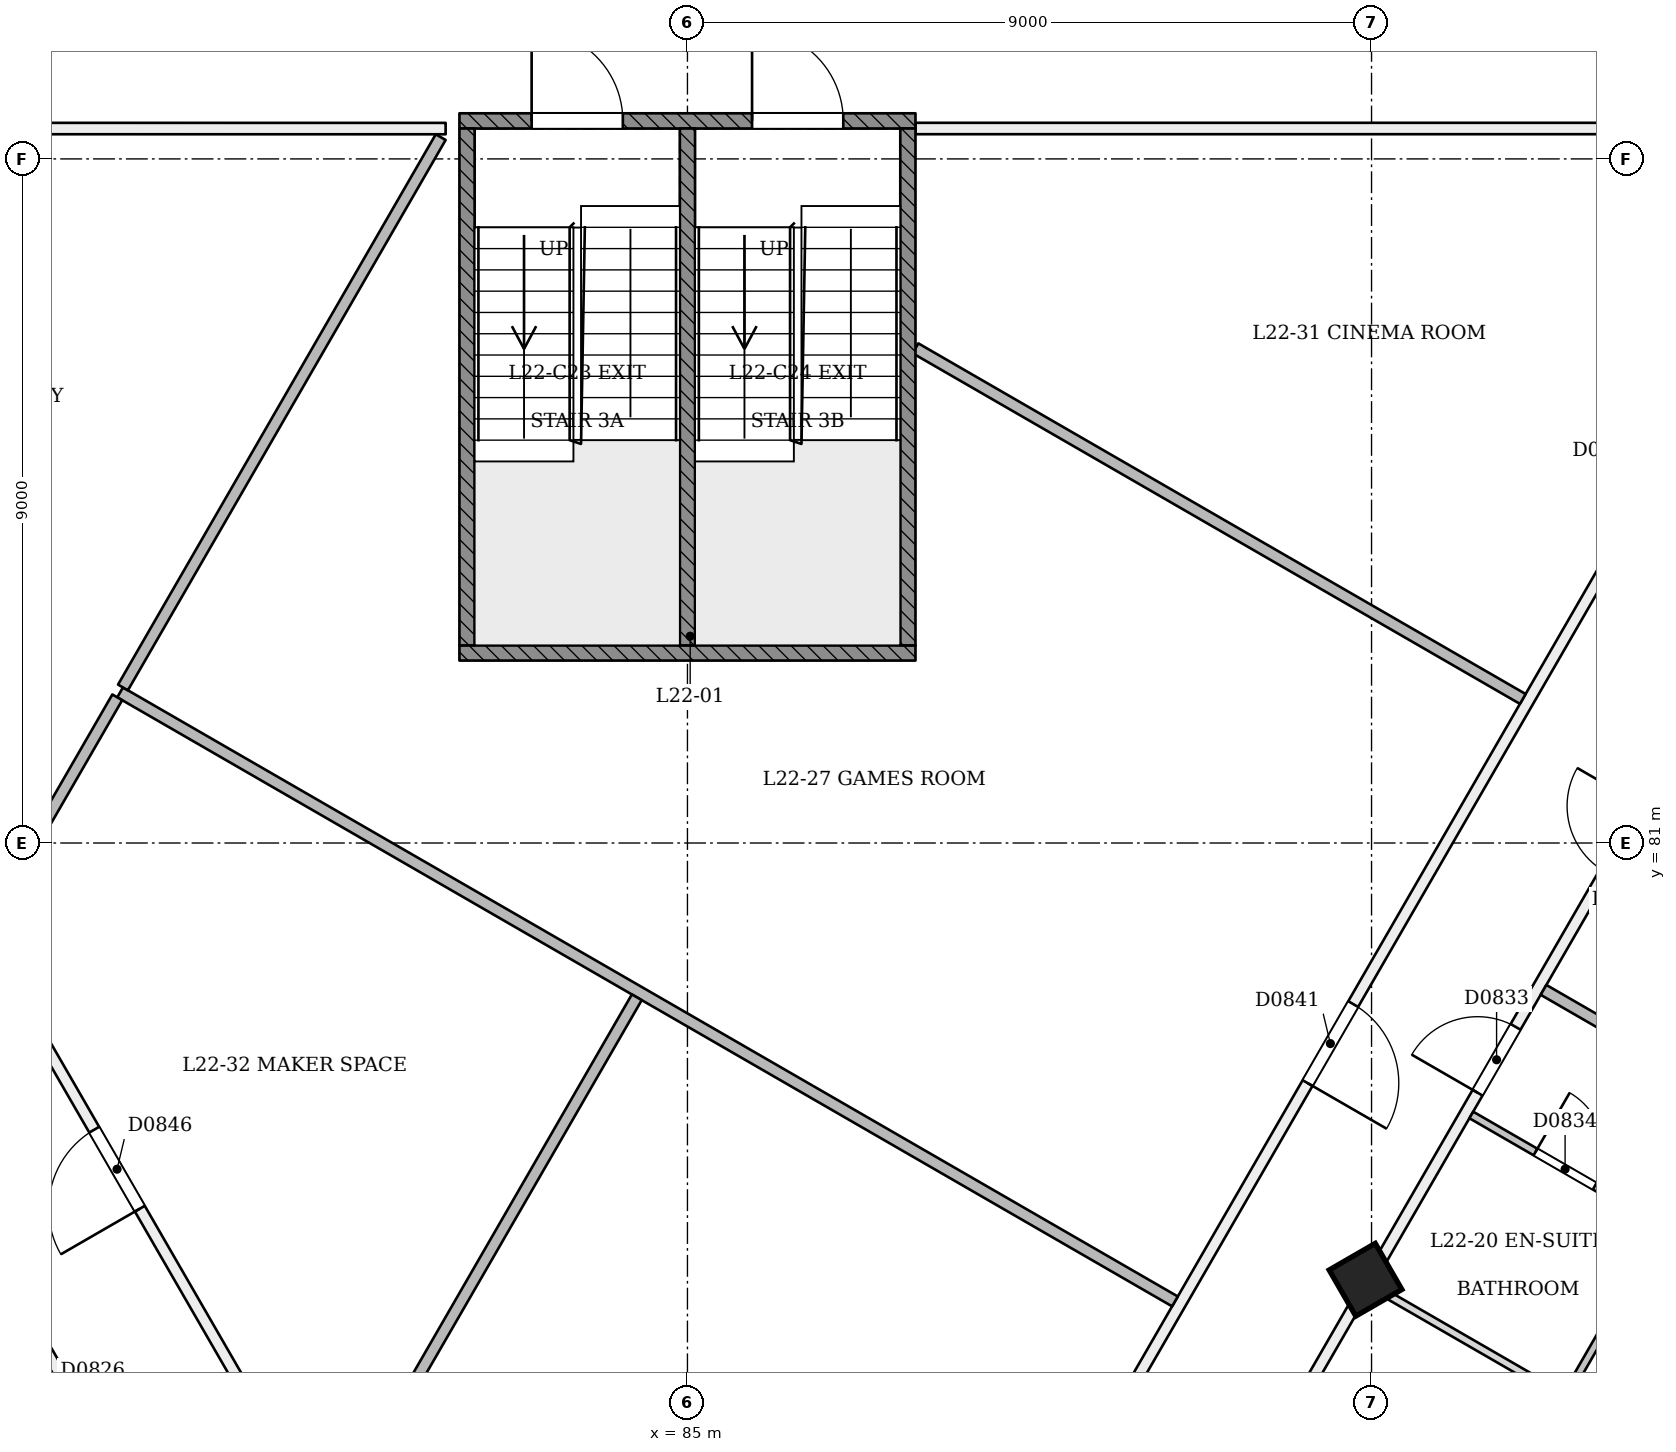
"""IFC4 building model, lengths in metres.
Left out: names, types, materials, properties, quantities, classifications, styles, units other than length and angle.
Written with IfcOpenShell. Run it as: python <this file> out.ifc"""

import sys

from ifc_helpers import new_model, si_unit, direction, frame, frame_2d, origin, origin_2d, place, context, subcontext, project, spatial, rectangle, extrude, element, fill, save


model = new_model("IFC4")
c1 = context("Model", 3, precision=1e-05, world=origin(), true_north=direction((0.0, 1.0)))
c2 = subcontext(c1, "Body", "Model", "MODEL_VIEW")
j1 = project(units=[si_unit("LENGTHUNIT", "METRE"), si_unit("PLANEANGLEUNIT", "RADIAN")], contexts=[c1])
p1 = place(None, origin())
s1 = spatial("IfcSite", under=j1, at=p1, CompositionType="ELEMENT")
p2 = place(p1, origin())
s2 = spatial("IfcBuilding", under=s1, at=p2, CompositionType="ELEMENT")
p3 = place(p2, frame((0.0, 0.0, 88.2)))
s3 = spatial("IfcBuildingStorey", under=s2, at=p3, CompositionType="ELEMENT", Elevation=88.2)
p4 = place(p3, frame((93.948, 75.207, -0.021), z_axis=(-0.02222134892, 0.038480872521, 0.999012229206), x_axis=(-0.500169969809, -0.865642163156, 0.022218160761)))
e1 = element("IfcColumn", 1, at=p4, inside=s3, PredefinedType="COLUMN", context=c2, shape_type="SweptSolid", body=[
    extrude(rectangle(XDim=0.7, YDim=0.7, at=origin_2d()), origin(), (0.0, 0.0, 1.0), 3.604),
])
p5 = place(p3, frame((63.198, 97.473, 0.0), z_axis=(0.0, 0.0, 1.0), x_axis=(0.499996804348, -0.866027248787, 0.0)))
e2 = element("IfcWall", 2, at=p5, inside=s3, PredefinedType="PARTITIONING", context=c2, shape_type="SweptSolid", body=[
    extrude(rectangle(XDim=42.418, YDim=0.15, at=frame_2d((21.209, 0.0))), origin(), (0.0, 0.0, 1.0), 2.7),
])
p6 = place(p5, frame((3.123, 0.0, 0.0)))
e3 = element("IfcOpeningElement", 3, at=p6, cuts=e2, PredefinedType="OPENING", context=c2, shape_type="SweptSolid", body=[
    extrude(rectangle(XDim=1.2, YDim=2.1, at=frame_2d((0.6, 1.05))), frame((0.0, 0.085, 0.0), z_axis=(0.0, -1.0, 0.0), x_axis=(1.0, 0.0, 0.0)), (0.0, 0.0, 1.0), 0.171),
])
p7 = place(p5, frame((10.538, 0.0, 0.0)))
e4 = element("IfcOpeningElement", 4, at=p7, cuts=e2, PredefinedType="OPENING", context=c2, shape_type="SweptSolid", body=[
    extrude(rectangle(XDim=1.1, YDim=2.1, at=frame_2d((0.55, 1.05))), frame((0.0, 0.085, 0.0), z_axis=(0.0, -1.0, 0.0), x_axis=(1.0, 0.0, 0.0)), (0.0, 0.0, 1.0), 0.171),
])
p8 = place(p5, frame((12.814, 0.0, 0.0)))
e5 = element("IfcOpeningElement", 5, at=p8, cuts=e2, PredefinedType="OPENING", context=c2, shape_type="SweptSolid", body=[
    extrude(rectangle(XDim=1.0, YDim=2.1, at=frame_2d((0.5, 1.05))), frame((0.0, 0.085, 0.0), z_axis=(0.0, -1.0, 0.0), x_axis=(1.0, 0.0, 0.0)), (0.0, 0.0, 1.0), 0.171),
])
p9 = place(p5, frame((20.609, 0.0, 0.0)))
e6 = element("IfcOpeningElement", 6, at=p9, cuts=e2, PredefinedType="OPENING", context=c2, shape_type="SweptSolid", body=[
    extrude(rectangle(XDim=1.2, YDim=2.1, at=frame_2d((0.6, 1.05))), frame((0.0, 0.085, 0.0), z_axis=(0.0, -1.0, 0.0), x_axis=(1.0, 0.0, 0.0)), (0.0, 0.0, 1.0), 0.171),
])
p10 = place(p5, frame((27.459, 0.0, 0.0)))
e7 = element("IfcOpeningElement", 7, at=p10, cuts=e2, PredefinedType="OPENING", context=c2, shape_type="SweptSolid", body=[
    extrude(rectangle(XDim=1.0, YDim=2.1, at=frame_2d((0.5, 1.05))), frame((0.0, 0.085, 0.0), z_axis=(0.0, -1.0, 0.0), x_axis=(1.0, 0.0, 0.0)), (0.0, 0.0, 1.0), 0.171),
])
p11 = place(p5, frame((31.959, 0.0, 0.0)))
e8 = element("IfcOpeningElement", 8, at=p11, cuts=e2, PredefinedType="OPENING", context=c2, shape_type="SweptSolid", body=[
    extrude(rectangle(XDim=1.0, YDim=2.1, at=frame_2d((0.5, 1.05))), frame((0.0, 0.085, 0.0), z_axis=(0.0, -1.0, 0.0), x_axis=(1.0, 0.0, 0.0)), (0.0, 0.0, 1.0), 0.171),
])
p12 = place(p5, frame((40.905, 0.0, 0.0)))
e9 = element("IfcOpeningElement", 9, at=p12, cuts=e2, PredefinedType="OPENING", context=c2, shape_type="SweptSolid", body=[
    extrude(rectangle(XDim=1.2, YDim=2.1, at=frame_2d((0.6, 1.05))), frame((0.0, 0.085, 0.0), z_axis=(0.0, -1.0, 0.0), x_axis=(1.0, 0.0, 0.0)), (0.0, 0.0, 1.0), 0.171),
])
p13 = place(p3, frame((87.198, 63.517, 0.0), z_axis=(0.0, 0.0, 1.0), x_axis=(0.499999136801, 0.866025902152, 0.0)))
e10 = element("IfcWall", 10, at=p13, inside=s3, PredefinedType="PARTITIONING", context=c2, shape_type="SweptSolid", body=[
    extrude(rectangle(XDim=39.209, YDim=0.15, at=frame_2d((19.604, 0.0))), origin(), (0.0, 0.0, 1.0), 2.7),
])
p14 = place(p13, frame((2.8, 0.0, 0.0)))
e11 = element("IfcOpeningElement", 11, at=p14, cuts=e10, PredefinedType="OPENING", context=c2, shape_type="SweptSolid", body=[
    extrude(rectangle(XDim=1.2, YDim=2.1, at=frame_2d((0.6, 1.05))), frame((0.0, 0.085, 0.0), z_axis=(0.0, -1.0, 0.0), x_axis=(1.0, 0.0, 0.0)), (0.0, 0.0, 1.0), 0.171),
])
p15 = place(p13, frame((9.72, 0.0, 0.0)))
e12 = element("IfcOpeningElement", 12, at=p15, cuts=e10, PredefinedType="OPENING", context=c2, shape_type="SweptSolid", body=[
    extrude(rectangle(XDim=1.0, YDim=2.1, at=frame_2d((0.5, 1.05))), frame((0.0, 0.085, 0.0), z_axis=(0.0, -1.0, 0.0), x_axis=(1.0, 0.0, 0.0)), (0.0, 0.0, 1.0), 0.171),
])
p16 = place(p13, frame((16.395, 0.0, 0.0)))
e13 = element("IfcOpeningElement", 13, at=p16, cuts=e10, PredefinedType="OPENING", context=c2, shape_type="SweptSolid", body=[
    extrude(rectangle(XDim=1.0, YDim=2.1, at=frame_2d((0.5, 1.05))), frame((0.0, 0.085, 0.0), z_axis=(0.0, -1.0, 0.0), x_axis=(1.0, 0.0, 0.0)), (0.0, 0.0, 1.0), 0.171),
])
p17 = place(p13, frame((19.75, 0.0, 0.0)))
e14 = element("IfcOpeningElement", 14, at=p17, cuts=e10, PredefinedType="OPENING", context=c2, shape_type="SweptSolid", body=[
    extrude(rectangle(XDim=1.0, YDim=2.1, at=frame_2d((0.5, 1.05))), frame((0.0, 0.085, 0.0), z_axis=(0.0, -1.0, 0.0), x_axis=(1.0, 0.0, 0.0)), (0.0, 0.0, 1.0), 0.171),
])
p18 = place(p13, frame((25.395, 0.0, 0.0)))
e15 = element("IfcOpeningElement", 15, at=p18, cuts=e10, PredefinedType="OPENING", context=c2, shape_type="SweptSolid", body=[
    extrude(rectangle(XDim=1.0, YDim=2.1, at=frame_2d((0.5, 1.05))), frame((0.0, 0.085, 0.0), z_axis=(0.0, -1.0, 0.0), x_axis=(1.0, 0.0, 0.0)), (0.0, 0.0, 1.0), 0.171),
])
p19 = place(p13, frame((29.8, 0.0, 0.0)))
e16 = element("IfcOpeningElement", 16, at=p19, cuts=e10, PredefinedType="OPENING", context=c2, shape_type="SweptSolid", body=[
    extrude(rectangle(XDim=1.2, YDim=2.1, at=frame_2d((0.6, 1.05))), frame((0.0, 0.085, 0.0), z_axis=(0.0, -1.0, 0.0), x_axis=(1.0, 0.0, 0.0)), (0.0, 0.0, 1.0), 0.171),
])
p20 = place(p13, frame((37.225, 0.0, 0.0)))
e17 = element("IfcOpeningElement", 17, at=p20, cuts=e10, PredefinedType="OPENING", context=c2, shape_type="SweptSolid", body=[
    extrude(rectangle(XDim=1.0, YDim=2.1, at=frame_2d((0.5, 1.05))), frame((0.0, 0.085, 0.0), z_axis=(0.0, -1.0, 0.0), x_axis=(1.0, 0.0, 0.0)), (0.0, 0.0, 1.0), 0.171),
])
p21 = place(p3, frame((100.409, 90.4, 0.0), z_axis=(0.0, 0.0, 1.0), x_axis=(-0.500001354695, -0.86602462165, 0.0)))
e18 = element("IfcWall", 18, at=p21, inside=s3, PredefinedType="PARTITIONING", context=c2, shape_type="SweptSolid", body=[
    extrude(rectangle(XDim=30.688, YDim=0.15, at=frame_2d((15.344, 0.0))), origin(), (0.0, 0.0, 1.0), 3.1),
])
p22 = place(p21, frame((13.301, 0.0, 0.0)))
e19 = element("IfcOpeningElement", 19, at=p22, cuts=e18, PredefinedType="OPENING", context=c2, shape_type="SweptSolid", body=[
    extrude(rectangle(XDim=1.2, YDim=2.1, at=frame_2d((0.6, 1.05))), frame((0.0, 0.085, 0.0), z_axis=(0.0, -1.0, 0.0), x_axis=(1.0, 0.0, 0.0)), (0.0, 0.0, 1.0), 0.171),
])
p23 = place(p21, frame((4.95, 0.0, 0.0)))
e20 = element("IfcOpeningElement", 20, at=p23, cuts=e18, PredefinedType="OPENING", context=c2, shape_type="SweptSolid", body=[
    extrude(rectangle(XDim=1.2, YDim=2.1, at=frame_2d((0.6, 1.05))), frame((0.0, 0.085, 0.0), z_axis=(0.0, -1.0, 0.0), x_axis=(1.0, 0.0, 0.0)), (0.0, 0.0, 1.0), 0.171),
])
p24 = place(p3, frame((85.0, 63.711, 0.0), z_axis=(0.0, 0.0, 1.0), x_axis=(-0.500003837735, 0.866023188056, 0.0)))
e21 = element("IfcWall", 21, at=p24, inside=s3, PredefinedType="PARTITIONING", context=c2, shape_type="SweptSolid", body=[
    extrude(rectangle(XDim=30.818, YDim=0.15, at=frame_2d((15.409, 0.0))), origin(), (0.0, 0.0, 1.0), 3.1),
])
p25 = place(p24, frame((6.476, 0.0, 0.0)))
e22 = element("IfcOpeningElement", 22, at=p25, cuts=e21, PredefinedType="OPENING", context=c2, shape_type="SweptSolid", body=[
    extrude(rectangle(XDim=1.2, YDim=2.1, at=frame_2d((0.6, 1.05))), frame((0.0, 0.085, 0.0), z_axis=(0.0, -1.0, 0.0), x_axis=(1.0, 0.0, 0.0)), (0.0, 0.0, 1.0), 0.171),
])
p26 = place(p24, frame((24.104, 0.0, 0.0)))
e23 = element("IfcOpeningElement", 23, at=p26, cuts=e21, PredefinedType="OPENING", context=c2, shape_type="SweptSolid", body=[
    extrude(rectangle(XDim=1.2, YDim=2.1, at=frame_2d((0.6, 1.05))), frame((0.0, 0.085, 0.0), z_axis=(0.0, -1.0, 0.0), x_axis=(1.0, 0.0, 0.0)), (0.0, 0.0, 1.0), 0.171),
])
p27 = place(p24, frame((14.409, 0.0, 0.0)))
e24 = element("IfcOpeningElement", 24, at=p27, cuts=e21, PredefinedType="OPENING", context=c2, shape_type="SweptSolid", body=[
    extrude(rectangle(XDim=1.2, YDim=2.1, at=frame_2d((0.6, 1.05))), frame((0.0, 0.085, 0.0), z_axis=(0.0, -1.0, 0.0), x_axis=(1.0, 0.0, 0.0)), (0.0, 0.0, 1.0), 0.171),
])
p28 = place(p3, frame((69.721, 90.4, 0.0), z_axis=(0.0, 0.0, 1.0), x_axis=(0.999999996742, -8.0721651e-05, 0.0)))
e25 = element("IfcWall", 25, at=p28, inside=s3, PredefinedType="PARTITIONING", context=c2, shape_type="SweptSolid", body=[
    extrude(rectangle(XDim=12.098, YDim=0.15, at=frame_2d((6.049, 0.0))), origin(), (0.0, 0.0, 1.0), 3.1),
])
p29 = place(p3, frame((88.0, 90.4, 0.0), z_axis=(0.0, 0.0, 1.0), x_axis=(1.0, 0.0, 0.0)))
e26 = element("IfcWall", 26, at=p29, inside=s3, PredefinedType="PARTITIONING", context=c2, shape_type="SweptSolid", body=[
    extrude(rectangle(XDim=12.279, YDim=0.15, at=frame_2d((6.14, 0.0))), origin(), (0.0, 0.0, 1.0), 3.1),
])
p30 = place(p3, frame((96.476, 73.748, 0.0), z_axis=(0.0, 0.0, 1.0), x_axis=(-0.866011243319, 0.500024525844, 0.0)))
e27 = element("IfcWall", 27, at=p30, inside=s3, PredefinedType="PARTITIONING", context=c2, shape_type="SweptSolid", body=[
    extrude(rectangle(XDim=2.845, YDim=0.1, at=frame_2d((1.422, 0.0))), origin(), (0.0, 0.0, 1.0), 2.7),
])
p31 = place(p3, frame((95.312, 77.422, 0.0), z_axis=(0.0, 0.0, 1.0), x_axis=(0.86601045545, -0.500025890382, 0.0)))
e28 = element("IfcWall", 28, at=p31, inside=s3, PredefinedType="PARTITIONING", context=c2, shape_type="SweptSolid", body=[
    extrude(rectangle(XDim=2.925, YDim=0.1, at=frame_2d((1.462, 0.0))), origin(), (0.0, 0.0, 1.0), 3.1),
])
p32 = place(p31, frame((0.975, 0.0, 0.0)))
e29 = element("IfcOpeningElement", 29, at=p32, cuts=e28, PredefinedType="OPENING", context=c2, shape_type="SweptSolid", body=[
    extrude(rectangle(XDim=0.9, YDim=2.1, at=frame_2d((0.45, 1.05))), frame((0.0, 0.061, 0.0), z_axis=(0.0, -1.0, 0.0), x_axis=(1.0, 0.0, 0.0)), (0.0, 0.0, 1.0), 0.121),
])
p33 = place(p3, frame((97.846, 75.96, 0.0), z_axis=(0.0, 0.0, 1.0), x_axis=(-0.500077740698, -0.865980515519, 0.0)))
e30 = element("IfcWall", 30, at=p33, inside=s3, PredefinedType="PARTITIONING", context=c2, shape_type="SweptSolid", body=[
    extrude(rectangle(XDim=2.3, YDim=0.1, at=frame_2d((1.15, 0.0))), origin(), (0.0, 0.0, 1.0), 3.1),
])
p34 = place(p3, frame((101.758, 75.895, 0.0), z_axis=(0.0, 0.0, 1.0), x_axis=(-0.866025401434, 0.500000004071, 0.0)))
e31 = element("IfcWall", 31, at=p34, inside=s3, PredefinedType="PARTITIONING", context=c2, shape_type="SweptSolid", body=[
    extrude(rectangle(XDim=6.345, YDim=0.15, at=frame_2d((3.173, 0.0))), origin(), (0.0, 0.0, 1.0), 2.6),
])
p35 = place(p3, frame((77.536, 82.981, 0.0), z_axis=(0.0, 0.0, 1.0), x_axis=(0.866023714899, -0.500002925224, 0.0)))
e32 = element("IfcWall", 32, at=p35, inside=s3, PredefinedType="PARTITIONING", context=c2, shape_type="SweptSolid", body=[
    extrude(rectangle(XDim=16.024, YDim=0.15, at=frame_2d((8.012, 0.0))), origin(), (0.0, 0.0, 1.0), 3.1),
])
p36 = place(p3, frame((81.754, 90.287, 0.0), z_axis=(0.0, 0.0, 1.0), x_axis=(-0.500002199304, -0.866024134012, 0.0)))
e33 = element("IfcWall", 33, at=p36, inside=s3, PredefinedType="PARTITIONING", context=c2, shape_type="SweptSolid", body=[
    extrude(rectangle(XDim=8.36, YDim=0.15, at=frame_2d((4.18, 0.0))), origin(), (0.0, 0.0, 1.0), 3.1),
])
p37 = place(p3, frame((95.99, 82.895, 0.0), z_axis=(0.0, 0.0, 1.0), x_axis=(-0.866018126392, 0.500012604601, 0.0)))
e34 = element("IfcWall", 34, at=p37, inside=s3, PredefinedType="PARTITIONING", context=c2, shape_type="SweptSolid", body=[
    extrude(rectangle(XDim=9.226, YDim=0.15, at=frame_2d((4.613, 0.0))), origin(), (0.0, 0.0, 1.0), 3.1),
])
p38 = place(p3, frame((84.334, 78.97, 0.0), z_axis=(0.0, 0.0, 1.0), x_axis=(-0.500001977421, -0.866024262117, 0.0)))
e35 = element("IfcWall", 35, at=p38, inside=s3, PredefinedType="PARTITIONING", context=c2, shape_type="SweptSolid", body=[
    extrude(rectangle(XDim=8.014, YDim=0.15, at=frame_2d((4.007, 0.0))), origin(), (0.0, 0.0, 1.0), 3.1),
])
p39 = place(p3, frame((75.77, 79.922, 0.0), z_axis=(0.0, 0.0, 1.0), x_axis=(0.49996696679, 0.866044474677, 0.0)))
e36 = element("IfcWall", 36, at=p39, inside=s3, PredefinedType="PARTITIONING", context=c2, shape_type="SweptSolid", body=[
    extrude(rectangle(XDim=3.457, YDim=0.15, at=frame_2d((1.729, 0.0))), origin(), (0.0, 0.0, 1.0), 3.1),
])
p40 = place(p3, frame((82.0, 90.5, 0.0), z_axis=(0.0, 0.0, 1.0), x_axis=(1.0, 0.0, 0.0)))
e37 = element("IfcWall", 37, at=p40, inside=s3, PredefinedType="SOLIDWALL", context=c2, shape_type="SweptSolid", body=[
    extrude(rectangle(XDim=6.0, YDim=0.2, at=frame_2d((3.0, 0.0))), origin(), (0.0, 0.0, 1.0), 3.1),
])
p41 = place(p40, frame((0.95, 0.0, 0.0)))
e38 = element("IfcOpeningElement", 38, at=p41, cuts=e37, PredefinedType="OPENING", context=c2, shape_type="SweptSolid", body=[
    extrude(rectangle(XDim=1.2, YDim=2.1, at=frame_2d((0.6, 1.05))), frame((0.0, 0.11, 0.0), z_axis=(0.0, -1.0, 0.0), x_axis=(1.0, 0.0, 0.0)), (0.0, 0.0, 1.0), 0.221),
])
p42 = place(p40, frame((3.85, 0.0, 0.0)))
e39 = element("IfcOpeningElement", 39, at=p42, cuts=e37, PredefinedType="OPENING", context=c2, shape_type="SweptSolid", body=[
    extrude(rectangle(XDim=1.2, YDim=2.1, at=frame_2d((0.6, 1.05))), frame((0.0, 0.11, 0.0), z_axis=(0.0, -1.0, 0.0), x_axis=(1.0, 0.0, 0.0)), (0.0, 0.0, 1.0), 0.221),
])
p43 = place(p3, frame((82.0, 83.5, 0.0), z_axis=(0.0, 0.0, 1.0), x_axis=(1.0, 0.0, 0.0)))
e40 = element("IfcWall", 40, at=p43, inside=s3, PredefinedType="SOLIDWALL", context=c2, shape_type="SweptSolid", body=[
    extrude(rectangle(XDim=6.0, YDim=0.2, at=frame_2d((3.0, 0.0))), origin(), (0.0, 0.0, 1.0), 3.1),
])
for number, where, z_axis, x_axis in (
    (41, (82.1, 83.6, 0.0), (0.0, 0.0, 1.0), (0.0, 1.0, 0.0)),
    (42, (87.9, 83.6, 0.0), (0.0, 0.0, 1.0), (0.0, 1.0, 0.0)),
    (43, (85.0, 83.6, 0.0), (0.0, 0.0, 1.0), (0.0, 1.0, 0.0)),
):
    element("IfcWall", number, at=place(p3, frame(where, z_axis=z_axis, x_axis=x_axis)), inside=s3, PredefinedType="SOLIDWALL", context=c2, shape_type="SweptSolid", body=[
        extrude(rectangle(XDim=6.8, YDim=0.2, at=frame_2d((3.4, 0.0))), origin(), (0.0, 0.0, 1.0), 3.1),
    ])
p44 = place(p16, origin())
e44 = element("IfcDoor", 44, at=p44, inside=s3, OperationType="SINGLE_SWING_LEFT", PredefinedType="NOTDEFINED", context=c2, shape_type="SweptSolid", body=[
    extrude(rectangle(XDim=1.0, YDim=2.1, at=frame_2d((0.5, 1.05))), frame((0.0, 0.025, 0.0), z_axis=(0.0, -1.0, 0.0), x_axis=(1.0, 0.0, 0.0)), (0.0, 0.0, 1.0), 0.05),
])
fill(e13, e44)
p45 = place(p32, origin())
e45 = element("IfcDoor", 45, at=p45, inside=s3, OperationType="SINGLE_SWING_LEFT", PredefinedType="NOTDEFINED", context=c2, shape_type="SweptSolid", body=[
    extrude(rectangle(XDim=0.9, YDim=2.1, at=frame_2d((0.45, 1.05))), frame((0.0, 0.025, 0.0), z_axis=(0.0, -1.0, 0.0), x_axis=(1.0, 0.0, 0.0)), (0.0, 0.0, 1.0), 0.05),
])
fill(e29, e45)
p46 = place(p22, origin())
e46 = element("IfcDoor", 46, at=p46, inside=s3, OperationType="SINGLE_SWING_RIGHT", PredefinedType="NOTDEFINED", context=c2, shape_type="SweptSolid", body=[
    extrude(rectangle(XDim=1.2, YDim=2.1, at=frame_2d((0.6, 1.05))), frame((0.0, 0.025, 0.0), z_axis=(0.0, -1.0, 0.0), x_axis=(1.0, 0.0, 0.0)), (0.0, 0.0, 1.0), 0.05),
])
fill(e19, e46)
p47 = place(p27, origin())
e47 = element("IfcDoor", 47, at=p47, inside=s3, OperationType="SINGLE_SWING_LEFT", PredefinedType="NOTDEFINED", context=c2, shape_type="SweptSolid", body=[
    extrude(rectangle(XDim=1.2, YDim=2.1, at=frame_2d((0.6, 1.05))), frame((0.0, 0.025, 0.0), z_axis=(0.0, -1.0, 0.0), x_axis=(1.0, 0.0, 0.0)), (0.0, 0.0, 1.0), 0.05),
])
fill(e24, e47)
p48 = place(p41, origin())
e48 = element("IfcDoor", 48, at=p48, inside=s3, OperationType="SINGLE_SWING_LEFT", PredefinedType="NOTDEFINED", context=c2, shape_type="SweptSolid", body=[
    extrude(rectangle(XDim=1.2, YDim=2.1, at=frame_2d((0.6, 1.05))), frame((0.0, 0.025, 0.0), z_axis=(0.0, -1.0, 0.0), x_axis=(1.0, 0.0, 0.0)), (0.0, 0.0, 1.0), 0.05),
])
fill(e38, e48)
p49 = place(p42, origin())
e49 = element("IfcDoor", 49, at=p49, inside=s3, OperationType="SINGLE_SWING_LEFT", PredefinedType="NOTDEFINED", context=c2, shape_type="SweptSolid", body=[
    extrude(rectangle(XDim=1.2, YDim=2.1, at=frame_2d((0.6, 1.05))), frame((0.0, 0.025, 0.0), z_axis=(0.0, -1.0, 0.0), x_axis=(1.0, 0.0, 0.0)), (0.0, 0.0, 1.0), 0.05),
])
fill(e39, e49)
save(model, sys.argv[1])
